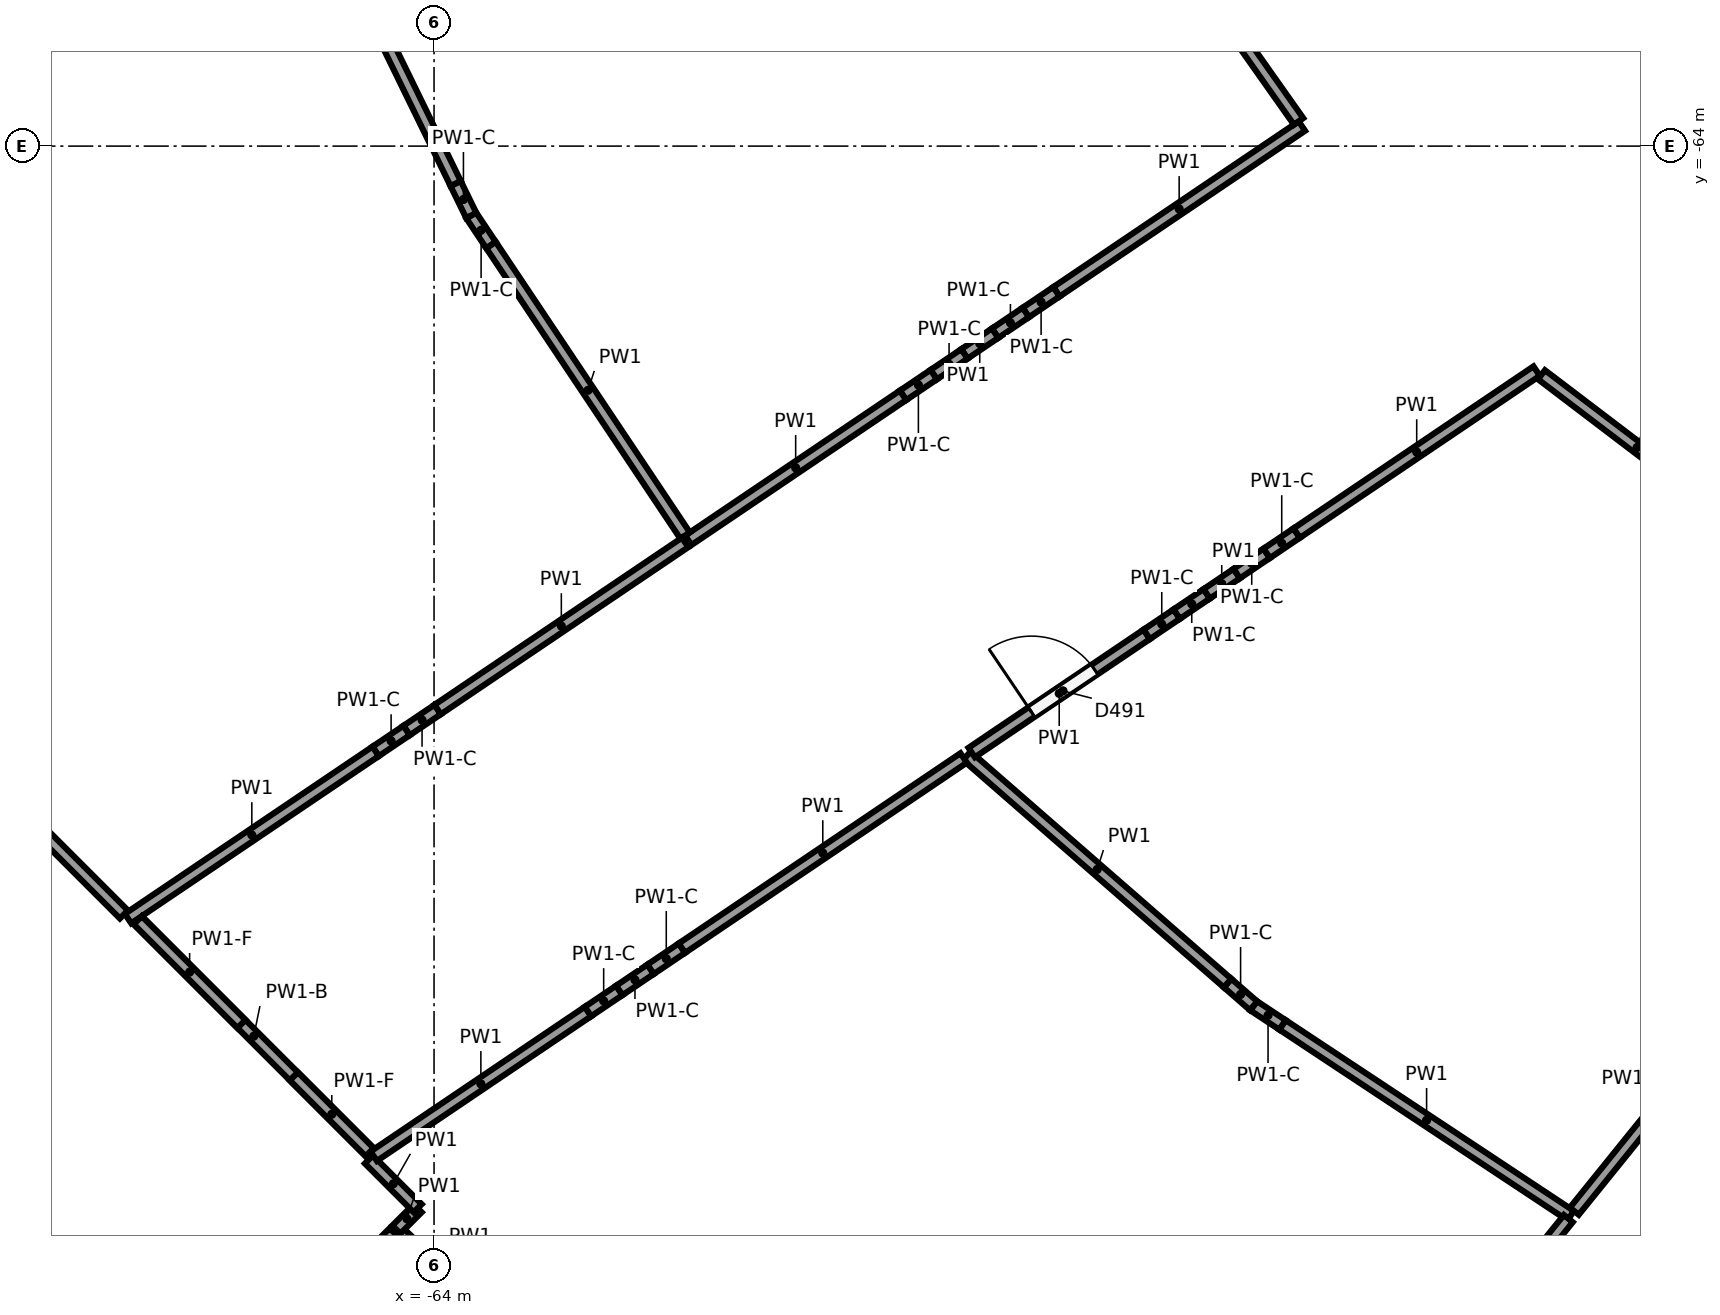
"""IFC4 building model, lengths in metres.
Left out: names, types, materials, properties, quantities, classifications, styles, units other than length and angle.
Written with IfcOpenShell. Run it as: python <this file> out.ifc"""

import sys

from ifc_helpers import new_model, si_unit, direction, frame, frame_2d, origin, origin_2d, place, context, subcontext, project, spatial, rectangle, circle, extrude, element, fill, save


model = new_model("IFC4")
c1 = context("Model", 3, precision=1e-05, world=origin(), true_north=direction((0.0, 1.0)))
c2 = subcontext(c1, "Body", "Model", "MODEL_VIEW")
j1 = project(units=[si_unit("LENGTHUNIT", "METRE"), si_unit("PLANEANGLEUNIT", "RADIAN")], contexts=[c1])
p1 = place(None, origin())
s1 = spatial("IfcSite", under=j1, at=p1, CompositionType="ELEMENT")
p2 = place(p1, origin())
s2 = spatial("IfcBuilding", under=s1, at=p2, CompositionType="ELEMENT")
p3 = place(p2, frame((0.0, 0.0, -4.0)))
s3 = spatial("IfcBuildingStorey", under=s2, at=p3, CompositionType="ELEMENT", Elevation=-4.0)
p4 = place(p3, frame((-59.049, -62.766, -0.4), z_axis=(0.0, 0.0, 1.0), x_axis=(1.0, 0.0, 0.0)))
e1 = element("IfcColumn", 1, at=p4, inside=s3, PredefinedType="COLUMN", context=c2, shape_type="SweptSolid", body=[
    extrude(circle(Radius=0.45, at=origin_2d()), origin(), (0.0, 0.0, 1.0), 4.4),
])
p5 = place(p3, frame((-60.222, -63.331, -0.4), z_axis=(0.0, 0.0, 1.0), x_axis=(1.0, 0.0, 0.0)))
e2 = element("IfcColumn", 2, at=p5, inside=s3, PredefinedType="COLUMN", context=c2, shape_type="SweptSolid", body=[
    extrude(circle(Radius=0.4, at=origin_2d()), origin(), (0.0, 0.0, 1.0), 4.4),
])
for number, where, z_axis, x_axis in (
    (3, (-67.972, -67.058, -0.4), (0.0, 0.0, 1.0), (1.0, 0.0, 0.0)),
    (4, (-50.553, -65.021, -0.4), (0.0, 0.0, 1.0), (1.0, 0.0, 0.0)),
    (5, (-54.82, -67.902, -0.4), (0.0, 0.0, 1.0), (1.0, 0.0, 0.0)),
):
    element("IfcColumn", number, at=place(p3, frame(where, z_axis=z_axis, x_axis=x_axis)), inside=s3, PredefinedType="COLUMN", context=c2, shape_type="SweptSolid", body=[
        extrude(circle(Radius=0.45, at=origin_2d()), origin(), (0.0, 0.0, 1.0), 4.4),
    ])
p6 = place(p3, frame((-55.94, -68.658, -0.4), z_axis=(0.0, 0.0, 1.0), x_axis=(1.0, 0.0, 0.0)))
e6 = element("IfcColumn", 6, at=p6, inside=s3, PredefinedType="COLUMN", context=c2, shape_type="SweptSolid", body=[
    extrude(circle(Radius=0.4, at=origin_2d()), origin(), (0.0, 0.0, 1.0), 4.4),
])
for number, where, z_axis, x_axis in (
    (7, (-63.068, -73.47, -0.4), (0.0, 0.0, 1.0), (1.0, 0.0, 0.0)),
    (8, (-49.518, -71.925, -0.4), (0.0, 0.0, 1.0), (1.0, 0.0, 0.0)),
):
    element("IfcColumn", number, at=place(p3, frame(where, z_axis=z_axis, x_axis=x_axis)), inside=s3, PredefinedType="COLUMN", context=c2, shape_type="SweptSolid", body=[
        extrude(circle(Radius=0.45, at=origin_2d()), origin(), (0.0, 0.0, 1.0), 4.4),
    ])
p7 = place(p3, frame((-50.572, -72.889, -0.4), z_axis=(0.0, 0.0, 1.0), x_axis=(1.0, 0.0, 0.0)))
e9 = element("IfcColumn", 9, at=p7, inside=s3, PredefinedType="COLUMN", context=c2, shape_type="SweptSolid", body=[
    extrude(circle(Radius=0.4, at=origin_2d()), origin(), (0.0, 0.0, 1.0), 4.4),
])
p8 = place(p3, frame((-56.915, -78.696, -0.4), z_axis=(0.0, 0.0, 1.0), x_axis=(1.0, 0.0, 0.0)))
e10 = element("IfcColumn", 10, at=p8, inside=s3, PredefinedType="COLUMN", context=c2, shape_type="SweptSolid", body=[
    extrude(circle(Radius=0.45, at=origin_2d()), origin(), (0.0, 0.0, 1.0), 4.4),
])
p9 = place(p3, frame((-52.582, -63.737, 0.0), z_axis=(0.0, 0.0, 1.0), x_axis=(-0.82882615394, -0.559506216718, 0.0)))
e11 = element("IfcWall", 11, at=p9, inside=s3, PredefinedType="PARTITIONING", context=c2, shape_type="SweptSolid", body=[
    extrude(rectangle(XDim=3.896, YDim=0.15, at=frame_2d((1.948, 0.0))), origin(), (0.0, 0.0, 1.0), 3.6),
])
p10 = place(p3, frame((-55.811, -65.917, 0.0), z_axis=(0.0, 0.0, 1.0), x_axis=(-0.828953242646, -0.559317907372, 0.0)))
e12 = element("IfcWall", 12, at=p10, inside=s3, PredefinedType="PARTITIONING", context=c2, shape_type="SweptSolid", body=[
    extrude(rectangle(XDim=0.487, YDim=0.15, at=frame_2d((0.244, 0.0))), origin(), (0.0, 0.0, 1.0), 2.7),
])
p11 = place(p3, frame((-56.215, -66.189, 0.0), z_axis=(0.0, 0.0, 1.0), x_axis=(-0.828796357195, -0.559550353678, 0.0)))
e13 = element("IfcWall", 13, at=p11, inside=s3, PredefinedType="PARTITIONING", context=c2, shape_type="SweptSolid", body=[
    extrude(rectangle(XDim=0.487, YDim=0.15, at=frame_2d((0.243, 0.0))), origin(), (0.0, 0.0, 1.0), 2.7),
])
p12 = place(p3, frame((-56.618, -66.461, 0.0), z_axis=(0.0, 0.0, 1.0), x_axis=(-0.828953242646, -0.559317907372, 0.0)))
e14 = element("IfcWall", 14, at=p12, inside=s3, PredefinedType="PARTITIONING", context=c2, shape_type="SweptSolid", body=[
    extrude(rectangle(XDim=0.487, YDim=0.15, at=frame_2d((0.244, 0.0))), origin(), (0.0, 0.0, 1.0), 3.6),
])
p13 = place(p3, frame((-57.022, -66.734, 0.0), z_axis=(0.0, 0.0, 1.0), x_axis=(-0.828563830016, -0.559894614717, 0.0)))
e15 = element("IfcWall", 15, at=p13, inside=s3, PredefinedType="PARTITIONING", context=c2, shape_type="SweptSolid", body=[
    extrude(rectangle(XDim=0.487, YDim=0.15, at=frame_2d((0.244, 0.0))), origin(), (0.0, 0.0, 1.0), 2.7),
])
p14 = place(p3, frame((-57.426, -67.007, 0.0), z_axis=(0.0, 0.0, 1.0), x_axis=(-0.828796357195, -0.559550353678, 0.0)))
e16 = element("IfcWall", 16, at=p14, inside=s3, PredefinedType="PARTITIONING", context=c2, shape_type="SweptSolid", body=[
    extrude(rectangle(XDim=0.487, YDim=0.15, at=frame_2d((0.243, 0.0))), origin(), (0.0, 0.0, 1.0), 2.7),
])
p15 = place(p3, frame((-57.829, -67.279, 0.0), z_axis=(0.0, 0.0, 1.0), x_axis=(-0.828841201566, -0.559483925226, 0.0)))
e17 = element("IfcWall", 17, at=p15, inside=s3, PredefinedType="PARTITIONING", context=c2, shape_type="SweptSolid", body=[
    extrude(rectangle(XDim=3.409, YDim=0.15, at=frame_2d((1.705, 0.0))), origin(), (0.0, 0.0, 1.0), 3.6),
])
p16 = place(p3, frame((-60.697, -69.124, 0.0), z_axis=(0.0, 0.0, 1.0), x_axis=(-0.555582071925, 0.831461701677, 0.0)))
e18 = element("IfcWall", 18, at=p16, inside=s3, PredefinedType="PARTITIONING", context=c2, shape_type="SweptSolid", body=[
    extrude(rectangle(XDim=4.598, YDim=0.15, at=frame_2d((2.299, 0.0))), origin(), (0.0, 0.0, 1.0), 3.6),
])
p17 = place(p3, frame((-63.251, -65.301, 0.0), z_axis=(0.0, 0.0, 1.0), x_axis=(-0.555302810798, 0.831648235927, 0.0)))
e19 = element("IfcWall", 19, at=p17, inside=s3, PredefinedType="PARTITIONING", context=c2, shape_type="SweptSolid", body=[
    extrude(rectangle(XDim=0.467, YDim=0.15, at=frame_2d((0.234, 0.0))), origin(), (0.0, 0.0, 1.0), 2.7),
])
p18 = place(p3, frame((-63.511, -64.912, 0.0), z_axis=(0.0, 0.0, 1.0), x_axis=(-0.439050948337, 0.898462166574, 0.0)))
e20 = element("IfcWall", 20, at=p18, inside=s3, PredefinedType="PARTITIONING", context=c2, shape_type="SweptSolid", body=[
    extrude(rectangle(XDim=0.468, YDim=0.15, at=frame_2d((0.234, 0.0))), origin(), (0.0, 0.0, 1.0), 2.7),
])
p19 = place(p3, frame((-63.716, -64.492, 0.0), z_axis=(0.0, 0.0, 1.0), x_axis=(-0.438947034321, 0.898512938728, 0.0)))
e21 = element("IfcWall", 21, at=p19, inside=s3, PredefinedType="PARTITIONING", context=c2, shape_type="SweptSolid", body=[
    extrude(rectangle(XDim=4.677, YDim=0.15, at=frame_2d((2.338, 0.0))), origin(), (0.0, 0.0, 1.0), 3.6),
])
p20 = place(p3, frame((-54.464, -61.071, 0.0), z_axis=(0.0, 0.0, 1.0), x_axis=(0.576788435752, -0.816893567353, 0.0)))
e22 = element("IfcWall", 22, at=p20, inside=s3, PredefinedType="PARTITIONING", context=c2, shape_type="SweptSolid", body=[
    extrude(rectangle(XDim=3.188, YDim=0.15, at=frame_2d((1.594, 0.0))), origin(), (0.0, 0.0, 1.0), 3.6),
])
p21 = place(p3, frame((-60.696, -69.214, 0.0), z_axis=(0.0, 0.0, 1.0), x_axis=(-0.828825631308, -0.559506990919, 0.0)))
e23 = element("IfcWall", 23, at=p21, inside=s3, PredefinedType="PARTITIONING", context=c2, shape_type="SweptSolid", body=[
    extrude(rectangle(XDim=3.931, YDim=0.15, at=frame_2d((1.965, 0.0))), origin(), (0.0, 0.0, 1.0), 3.6),
])
for number, where, z_axis, x_axis in (
    (24, (-63.954, -71.414, 0.0), (0.0, 0.0, 1.0), (-0.829, -0.56, 0.0)),
    (25, (-64.361, -71.688, 0.0), (0.0, 0.0, 1.0), (-0.829, -0.56, 0.0)),
):
    element("IfcWall", number, at=place(p3, frame(where, z_axis=z_axis, x_axis=x_axis)), inside=s3, PredefinedType="PARTITIONING", context=c2, shape_type="SweptSolid", body=[
        extrude(rectangle(XDim=0.491, YDim=0.15, at=frame_2d((0.246, 0.0))), origin(), (0.0, 0.0, 1.0), 2.7),
    ])
p22 = place(p3, frame((-64.769, -71.963, 0.0), z_axis=(0.0, 0.0, 1.0), x_axis=(-0.828825631308, -0.559506990919, 0.0)))
e26 = element("IfcWall", 26, at=p22, inside=s3, PredefinedType="PARTITIONING", context=c2, shape_type="SweptSolid", body=[
    extrude(rectangle(XDim=3.931, YDim=0.15, at=frame_2d((1.965, 0.0))), origin(), (0.0, 0.0, 1.0), 3.6),
])
p23 = place(p3, frame((-68.08, -74.109, 0.0), z_axis=(0.0, 0.0, 1.0), x_axis=(-0.70712613939, 0.707087422453, 0.0)))
e27 = element("IfcWall", 27, at=p23, inside=s3, PredefinedType="PARTITIONING", context=c2, shape_type="SweptSolid", body=[
    extrude(rectangle(XDim=6.306, YDim=0.15, at=frame_2d((3.153, 0.0))), origin(), (0.0, 0.0, 1.0), 3.6),
])
p24 = place(p3, frame((-49.045, -78.071, 0.0), z_axis=(0.0, 0.0, 1.0), x_axis=(-0.8339449215, 0.551847685421, 0.0)))
e28 = element("IfcWall", 28, at=p24, inside=s3, PredefinedType="PARTITIONING", context=c2, shape_type="SweptSolid", body=[
    extrude(rectangle(XDim=4.548, YDim=0.15, at=frame_2d((2.274, 0.0))), origin(), (0.0, 0.0, 1.0), 3.6),
])
for number, where, z_axis, x_axis in (
    (29, (-52.837, -75.561, 0.0), (0.0, 0.0, 1.0), (-0.834, 0.552, 0.0)),
    (30, (-53.217, -75.31, 0.0), (0.0, 0.0, 1.0), (-0.754, 0.657, 0.0)),
):
    element("IfcWall", number, at=place(p3, frame(where, z_axis=z_axis, x_axis=x_axis)), inside=s3, PredefinedType="PARTITIONING", context=c2, shape_type="SweptSolid", body=[
        extrude(rectangle(XDim=0.455, YDim=0.15, at=frame_2d((0.228, 0.0))), origin(), (0.0, 0.0, 1.0), 2.7),
    ])
p25 = place(p3, frame((-53.56, -75.011, 0.0), z_axis=(0.0, 0.0, 1.0), x_axis=(-0.753891280965, 0.656999190627, 0.0)))
e31 = element("IfcWall", 31, at=p25, inside=s3, PredefinedType="PARTITIONING", context=c2, shape_type="SweptSolid", body=[
    extrude(rectangle(XDim=4.551, YDim=0.15, at=frame_2d((2.275, 0.0))), origin(), (0.0, 0.0, 1.0), 3.6),
])
p26 = place(p3, frame((-56.926, -71.978, 0.0), z_axis=(0.0, 0.0, 1.0), x_axis=(0.828833397724, 0.559495485967, 0.0)))
e32 = element("IfcWall", 32, at=p26, inside=s3, PredefinedType="PARTITIONING", context=c2, shape_type="SweptSolid", body=[
    extrude(rectangle(XDim=2.779, YDim=0.15, at=frame_2d((1.39, 0.0))), origin(), (0.0, 0.0, 1.0), 3.6),
])
p27 = place(p26, frame((0.95, 0.0, 0.0)))
e33 = element("IfcOpeningElement", 33, at=p27, cuts=e32, PredefinedType="OPENING", context=c2, shape_type="SweptSolid", body=[
    extrude(rectangle(XDim=1.0, YDim=2.1, at=frame_2d((0.5, 1.05))), frame((0.0, 0.085, 0.0), z_axis=(0.0, -1.0, 0.0), x_axis=(1.0, 0.0, 0.0)), (0.0, 0.0, 1.0), 0.17),
])
p28 = place(p3, frame((-54.623, -70.423, 0.0), z_axis=(0.0, 0.0, 1.0), x_axis=(0.828801105453, 0.559543320575, 0.0)))
e34 = element("IfcWall", 34, at=p28, inside=s3, PredefinedType="PARTITIONING", context=c2, shape_type="SweptSolid", body=[
    extrude(rectangle(XDim=0.476, YDim=0.15, at=frame_2d((0.238, 0.0))), origin(), (0.0, 0.0, 1.0), 2.7),
])
p29 = place(p3, frame((-54.228, -70.157, 0.0), z_axis=(0.0, 0.0, 1.0), x_axis=(0.828961577554, 0.559305554182, 0.0)))
e35 = element("IfcWall", 35, at=p29, inside=s3, PredefinedType="PARTITIONING", context=c2, shape_type="SweptSolid", body=[
    extrude(rectangle(XDim=0.476, YDim=0.15, at=frame_2d((0.238, 0.0))), origin(), (0.0, 0.0, 1.0), 2.7),
])
p30 = place(p3, frame((-53.833, -69.89, 0.0), z_axis=(0.0, 0.0, 1.0), x_axis=(0.828563254438, 0.559895466489, 0.0)))
e36 = element("IfcWall", 36, at=p30, inside=s3, PredefinedType="PARTITIONING", context=c2, shape_type="SweptSolid", body=[
    extrude(rectangle(XDim=0.476, YDim=0.15, at=frame_2d((0.238, 0.0))), origin(), (0.0, 0.0, 1.0), 3.6),
])
p31 = place(p3, frame((-53.439, -69.624, 0.0), z_axis=(0.0, 0.0, 1.0), x_axis=(0.828961577554, 0.559305554182, 0.0)))
e37 = element("IfcWall", 37, at=p31, inside=s3, PredefinedType="PARTITIONING", context=c2, shape_type="SweptSolid", body=[
    extrude(rectangle(XDim=0.476, YDim=0.15, at=frame_2d((0.238, 0.0))), origin(), (0.0, 0.0, 1.0), 2.7),
])
p32 = place(p3, frame((-53.044, -69.357, 0.0), z_axis=(0.0, 0.0, 1.0), x_axis=(0.828801105453, 0.559543320575, 0.0)))
e38 = element("IfcWall", 38, at=p32, inside=s3, PredefinedType="PARTITIONING", context=c2, shape_type="SweptSolid", body=[
    extrude(rectangle(XDim=0.476, YDim=0.15, at=frame_2d((0.238, 0.0))), origin(), (0.0, 0.0, 1.0), 2.7),
])
p33 = place(p3, frame((-52.65, -69.091, 0.0), z_axis=(0.0, 0.0, 1.0), x_axis=(0.828831583129, 0.559498174088, 0.0)))
e39 = element("IfcWall", 39, at=p33, inside=s3, PredefinedType="PARTITIONING", context=c2, shape_type="SweptSolid", body=[
    extrude(rectangle(XDim=3.809, YDim=0.15, at=frame_2d((1.904, 0.0))), origin(), (0.0, 0.0, 1.0), 3.6),
])
p34 = place(p3, frame((-49.43, -67.008, 0.0), z_axis=(0.0, 0.0, 1.0), x_axis=(0.796072912049, -0.605200725959, 0.0)))
e40 = element("IfcWall", 40, at=p34, inside=s3, PredefinedType="PARTITIONING", context=c2, shape_type="SweptSolid", body=[
    extrude(rectangle(XDim=3.162, YDim=0.15, at=frame_2d((1.581, 0.0))), origin(), (0.0, 0.0, 1.0), 3.6),
])
p35 = place(p3, frame((-46.869, -75.375, 0.0), z_axis=(0.0, 0.0, 1.0), x_axis=(-0.628018502996, -0.77819840651, 0.0)))
e41 = element("IfcWall", 41, at=p35, inside=s3, PredefinedType="PARTITIONING", context=c2, shape_type="SweptSolid", body=[
    extrude(rectangle(XDim=3.389, YDim=0.15, at=frame_2d((1.695, 0.0))), origin(), (0.0, 0.0, 1.0), 3.6),
])
p36 = place(p3, frame((-49.076, -78.11, 0.0), z_axis=(0.0, 0.0, 1.0), x_axis=(-0.62801256648, -0.778203197335, 0.0)))
e42 = element("IfcWall", 42, at=p36, inside=s3, PredefinedType="PARTITIONING", context=c2, shape_type="SweptSolid", body=[
    extrude(rectangle(XDim=3.87, YDim=0.15, at=frame_2d((1.935, 0.0))), origin(), (0.0, 0.0, 1.0), 3.6),
])
p37 = place(p3, frame((-63.396, -79.297, 0.0), z_axis=(0.0, 0.0, 1.0), x_axis=(-0.725626624964, 0.688088657909, 0.0)))
e43 = element("IfcWall", 43, at=p37, inside=s3, PredefinedType="PARTITIONING", context=c2, shape_type="SweptSolid", body=[
    extrude(rectangle(XDim=1.515, YDim=0.15, at=frame_2d((0.758, 0.0))), origin(), (0.0, 0.0, 1.0), 3.6),
])
p38 = place(p3, frame((-64.496, -78.254, 0.0), z_axis=(0.0, 0.0, 1.0), x_axis=(0.706798874946, 0.707414553409, 0.0)))
e44 = element("IfcWall", 44, at=p38, inside=s3, PredefinedType="PARTITIONING", context=c2, shape_type="SweptSolid", body=[
    extrude(rectangle(XDim=0.396, YDim=0.15, at=frame_2d((0.198, 0.0))), origin(), (0.0, 0.0, 1.0), 3.6),
])
p39 = place(p3, frame((-64.216, -77.973, 0.0), z_axis=(0.0, 0.0, 1.0), x_axis=(-0.707106781187, 0.707106781187, 0.0)))
e45 = element("IfcWall", 45, at=p39, inside=s3, PredefinedType="PARTITIONING", context=c2, shape_type="SweptSolid", body=[
    extrude(rectangle(XDim=0.907, YDim=0.15, at=frame_2d((0.454, 0.0))), origin(), (0.0, 0.0, 1.0), 3.6),
])
p40 = place(p3, frame((-64.794, -77.289, 0.0), z_axis=(0.0, 0.0, 1.0), x_axis=(0.828834529993, 0.559493808626, 0.0)))
e46 = element("IfcWall", 46, at=p40, inside=s3, PredefinedType="PARTITIONING", context=c2, shape_type="SweptSolid", body=[
    extrude(rectangle(XDim=3.402, YDim=0.15, at=frame_2d((1.701, 0.0))), origin(), (0.0, 0.0, 1.0), 3.6),
])
p41 = place(p3, frame((-61.974, -75.386, 0.0), z_axis=(0.0, 0.0, 1.0), x_axis=(0.828632099968, 0.559793571687, 0.0)))
e47 = element("IfcWall", 47, at=p41, inside=s3, PredefinedType="PARTITIONING", context=c2, shape_type="SweptSolid", body=[
    extrude(rectangle(XDim=0.497, YDim=0.15, at=frame_2d((0.249, 0.0))), origin(), (0.0, 0.0, 1.0), 2.7),
])
p42 = place(p3, frame((-61.562, -75.108, 0.0), z_axis=(0.0, 0.0, 1.0), x_axis=(0.828939751849, 0.559337901277, 0.0)))
e48 = element("IfcWall", 48, at=p42, inside=s3, PredefinedType="PARTITIONING", context=c2, shape_type="SweptSolid", body=[
    extrude(rectangle(XDim=0.497, YDim=0.15, at=frame_2d((0.249, 0.0))), origin(), (0.0, 0.0, 1.0), 2.7),
])
p43 = place(p3, frame((-61.15, -74.83, 0.0), z_axis=(0.0, 0.0, 1.0), x_axis=(0.828632099968, 0.559793571687, 0.0)))
e49 = element("IfcWall", 49, at=p43, inside=s3, PredefinedType="PARTITIONING", context=c2, shape_type="SweptSolid", body=[
    extrude(rectangle(XDim=0.497, YDim=0.15, at=frame_2d((0.249, 0.0))), origin(), (0.0, 0.0, 1.0), 2.7),
])
p44 = place(p3, frame((-60.739, -74.552, 0.0), z_axis=(0.0, 0.0, 1.0), x_axis=(0.8288366496, 0.559490668626, 0.0)))
e50 = element("IfcWall", 50, at=p44, inside=s3, PredefinedType="PARTITIONING", context=c2, shape_type="SweptSolid", body=[
    extrude(rectangle(XDim=4.472, YDim=0.15, at=frame_2d((2.236, 0.0))), origin(), (0.0, 0.0, 1.0), 3.6),
])
p45 = place(p3, frame((-67.95, -81.708, 0.0), z_axis=(0.0, 0.0, 1.0), x_axis=(0.707106781187, 0.707106781187, 0.0)))
e51 = element("IfcWall", 51, at=p45, inside=s3, PredefinedType="PARTITIONING", context=c2, shape_type="SweptSolid", body=[
    extrude(rectangle(XDim=4.835, YDim=0.15, at=frame_2d((2.417, 0.0))), origin(), (0.0, 0.0, 1.0), 3.6),
])
p46 = place(p3, frame((-64.847, -77.236, 0.0), z_axis=(0.0, 0.0, 1.0), x_axis=(-0.707106781187, 0.707106781187, 0.0)))
e52 = element("IfcWall", 52, at=p46, inside=s3, PredefinedType="PARTITIONING", context=c2, shape_type="SweptSolid", body=[
    extrude(rectangle(XDim=4.315, YDim=0.15, at=frame_2d((2.158, 0.0))), origin(), (0.0, 0.0, 1.0), 2.5),
])
p47 = place(p3, frame((-64.847, -77.236, 2.5), z_axis=(0.0, 0.0, 1.0), x_axis=(-0.707106781187, 0.707106781187, 0.0)))
e53 = element("IfcWall", 53, at=p47, inside=s3, PredefinedType="PARTITIONING", context=c2, shape_type="SweptSolid", body=[
    extrude(rectangle(XDim=1.411, YDim=0.15, at=frame_2d((0.706, 0.0))), origin(), (0.0, 0.0, 1.0), 1.1),
])
p48 = place(p3, frame((-66.534, -75.549, 2.5), z_axis=(0.0, 0.0, 1.0), x_axis=(-0.707106781187, 0.707106781187, 0.0)))
e54 = element("IfcWall", 54, at=p48, inside=s3, PredefinedType="PARTITIONING", context=c2, shape_type="SweptSolid", body=[
    extrude(rectangle(XDim=1.93, YDim=0.15, at=frame_2d((0.965, 0.0))), origin(), (0.0, 0.0, 1.0), 1.1),
])
p49 = place(p27, origin())
e55 = element("IfcDoor", 55, at=p49, inside=s3, OperationType="SINGLE_SWING_LEFT", PredefinedType="DOOR", context=c2, shape_type="SweptSolid", body=[
    extrude(rectangle(XDim=1.0, YDim=2.1, at=frame_2d((0.5, 1.05))), frame((0.0, 0.025, 0.0), z_axis=(0.0, -1.0, 0.0), x_axis=(1.0, 0.0, 0.0)), (0.0, 0.0, 1.0), 0.05),
])
fill(e33, e55)
save(model, sys.argv[1])
